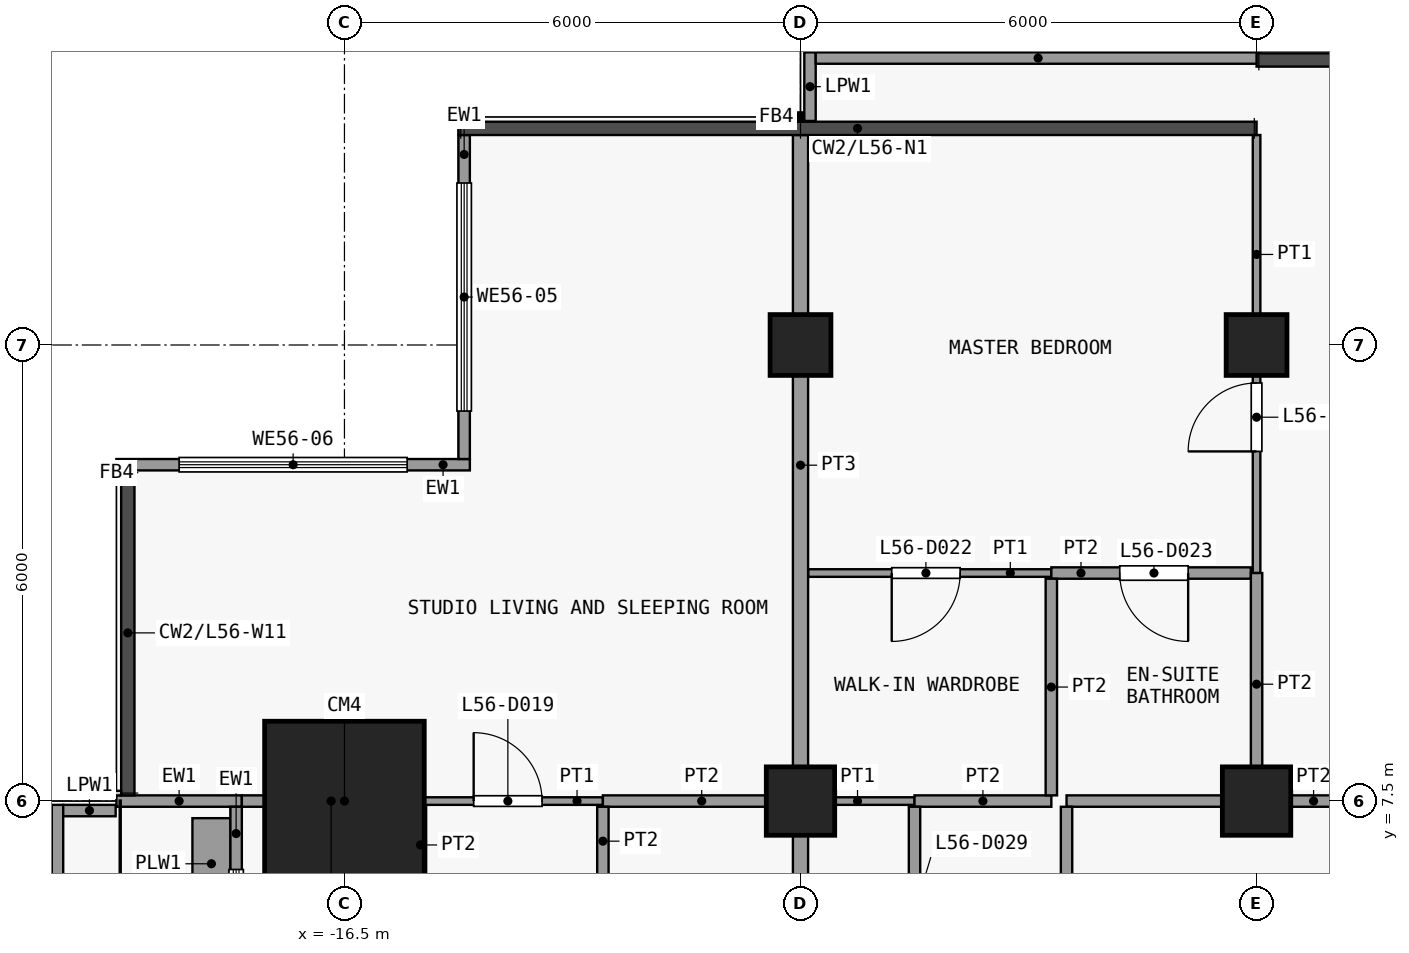
"""IFC4 building model, lengths in metres.
Left out: names, types, materials, properties, quantities, classifications, styles, units other than length and angle.
Written with IfcOpenShell. Run it as: python <this file> out.ifc"""

import sys

from ifc_helpers import new_model, si_unit, direction, frame, frame_2d, origin, origin_2d, place, context, subcontext, project, spatial, rectangle, extrude, element, fill, save


model = new_model("IFC4")
c1 = context("Model", 3, precision=1e-05, world=origin(), true_north=direction((0.0, 1.0)))
c2 = subcontext(c1, "Body", "Model", "MODEL_VIEW")
j1 = project(units=[si_unit("LENGTHUNIT", "METRE"), si_unit("PLANEANGLEUNIT", "RADIAN")], contexts=[c1])
p1 = place(None, origin())
s1 = spatial("IfcSite", under=j1, at=p1, CompositionType="ELEMENT")
p2 = place(p1, origin())
s2 = spatial("IfcBuilding", under=s1, at=p2, CompositionType="ELEMENT")
p3 = place(p2, frame((0.0, 0.0, 223.1)))
s3 = spatial("IfcBuildingStorey", under=s2, at=p3, CompositionType="ELEMENT", Elevation=223.1)
p4 = place(p3, frame((-16.5, 7.5, 0.0), z_axis=(0.0, 0.0, 1.0), x_axis=(1.0, 0.0, 0.0)))
e1 = element("IfcColumn", 1, at=p4, inside=s3, PredefinedType="COLUMN", context=c2, shape_type="SweptSolid", body=[
    extrude(rectangle(XDim=2.1, YDim=2.1, at=origin_2d()), origin(), (0.0, 0.0, 1.0), 3.6),
])
p5 = place(p3, frame((-10.5, 7.5, 0.0), z_axis=(0.0, 0.0, 1.0), x_axis=(1.0, 0.0, 0.0)))
e2 = element("IfcColumn", 2, at=p5, inside=s3, PredefinedType="COLUMN", context=c2, shape_type="SweptSolid", body=[
    extrude(rectangle(XDim=0.9, YDim=0.9, at=origin_2d()), origin(), (0.0, 0.0, 1.0), 3.6),
])
p6 = place(p3, frame((-10.5, 13.5, 0.0), z_axis=(0.0, 0.0, 1.0), x_axis=(1.0, 0.0, 0.0)))
e3 = element("IfcColumn", 3, at=p6, inside=s3, PredefinedType="COLUMN", context=c2, shape_type="SweptSolid", body=[
    extrude(rectangle(XDim=0.8, YDim=0.8, at=origin_2d()), origin(), (0.0, 0.0, 1.0), 3.6),
])
p7 = place(p3, frame((-4.5, 7.5, 0.0), z_axis=(0.0, 0.0, 1.0), x_axis=(1.0, 0.0, 0.0)))
e4 = element("IfcColumn", 4, at=p7, inside=s3, PredefinedType="COLUMN", context=c2, shape_type="SweptSolid", body=[
    extrude(rectangle(XDim=0.9, YDim=0.9, at=origin_2d()), origin(), (0.0, 0.0, 1.0), 3.6),
])
p8 = place(p3, frame((-4.5, 13.5, 0.0), z_axis=(0.0, 0.0, 1.0), x_axis=(1.0, 0.0, 0.0)))
e5 = element("IfcColumn", 5, at=p8, inside=s3, PredefinedType="COLUMN", context=c2, shape_type="SweptSolid", body=[
    extrude(rectangle(XDim=0.8, YDim=0.8, at=origin_2d()), origin(), (0.0, 0.0, 1.0), 3.6),
])
p9 = place(p3, frame((-14.925, 12.0, 0.0), z_axis=(0.0, 0.0, 1.0), x_axis=(0.0, 1.0, 0.0)))
e6 = element("IfcWall", 6, at=p9, inside=s3, PredefinedType="SOLIDWALL", context=c2, shape_type="SweptSolid", body=[
    extrude(rectangle(XDim=4.262, YDim=0.15, at=frame_2d((2.131, 0.0))), origin(), (0.0, 0.0, 1.0), 3.3),
])
p10 = place(p9, frame((0.631, 0.0, 0.9)))
e7 = element("IfcOpeningElement", 7, at=p10, cuts=e6, PredefinedType="OPENING", context=c2, shape_type="SweptSolid", body=[
    extrude(rectangle(XDim=3.0, YDim=2.4, at=frame_2d((1.5, 1.2))), frame((0.0, 0.085, 0.0), z_axis=(0.0, -1.0, 0.0), x_axis=(1.0, 0.0, 0.0)), (0.0, 0.0, 1.0), 0.17),
])
p11 = place(p3, frame((-19.5, 11.925, 0.0), z_axis=(0.0, 0.0, 1.0), x_axis=(1.0, 0.0, 0.0)))
e8 = element("IfcWall", 8, at=p11, inside=s3, PredefinedType="SOLIDWALL", context=c2, shape_type="SweptSolid", body=[
    extrude(rectangle(XDim=4.65, YDim=0.15, at=frame_2d((2.325, 0.0))), origin(), (0.0, 0.0, 1.0), 3.3),
])
p12 = place(p11, frame((0.825, 0.0, 0.9)))
e9 = element("IfcOpeningElement", 9, at=p12, cuts=e8, PredefinedType="OPENING", context=c2, shape_type="SweptSolid", body=[
    extrude(rectangle(XDim=3.0, YDim=2.4, at=frame_2d((1.5, 1.2))), frame((0.0, 0.085, 0.0), z_axis=(0.0, -1.0, 0.0), x_axis=(1.0, 0.0, 0.0)), (0.0, 0.0, 1.0), 0.17),
])
p13 = place(p3, frame((-17.85, 7.5, 0.0), z_axis=(0.0, 0.0, 1.0), x_axis=(-1.0, 0.0, 0.0)))
e10 = element("IfcWall", 10, at=p13, inside=s3, PredefinedType="SOLIDWALL", context=c2, shape_type="SweptSolid", body=[
    extrude(rectangle(XDim=1.65, YDim=0.15, at=frame_2d((0.825, 0.0))), origin(), (0.0, 0.0, 1.0), 3.3),
])
p14 = place(p3, frame((-17.925, 1.575, 0.0), z_axis=(0.0, 0.0, 1.0), x_axis=(0.0, 1.0, 0.0)))
e11 = element("IfcWall", 11, at=p14, inside=s3, PredefinedType="SOLIDWALL", context=c2, shape_type="SweptSolid", body=[
    extrude(rectangle(XDim=5.85, YDim=0.15, at=frame_2d((2.925, 0.0))), origin(), (0.0, 0.0, 1.0), 3.3),
])
p15 = place(p14, frame((1.2, 0.0, 0.0)))
e12 = element("IfcOpeningElement", 12, at=p15, cuts=e11, PredefinedType="OPENING", context=c2, shape_type="SweptSolid", body=[
    extrude(rectangle(XDim=1.2, YDim=2.4, at=frame_2d((0.6, 1.2))), frame((0.0, 0.085, 0.0), z_axis=(0.0, -1.0, 0.0), x_axis=(1.0, 0.0, 0.0)), (0.0, 0.0, 1.0), 0.17),
])
p16 = place(p14, frame((0.25, 0.0, 0.9)))
e13 = element("IfcOpeningElement", 13, at=p16, cuts=e11, PredefinedType="OPENING", context=c2, shape_type="SweptSolid", body=[
    extrude(rectangle(XDim=0.7, YDim=2.1, at=frame_2d((0.35, 1.05))), frame((0.0, 0.085, 0.0), z_axis=(0.0, -1.0, 0.0), x_axis=(1.0, 0.0, 0.0)), (0.0, 0.0, 1.0), 0.17),
])
p17 = place(p14, frame((3.225, 0.0, 0.9)))
e14 = element("IfcOpeningElement", 14, at=p17, cuts=e11, PredefinedType="OPENING", context=c2, shape_type="SweptSolid", body=[
    extrude(rectangle(XDim=1.8, YDim=2.1, at=frame_2d((0.9, 1.05))), frame((0.0, 0.085, 0.0), z_axis=(0.0, -1.0, 0.0), x_axis=(1.0, 0.0, 0.0)), (0.0, 0.0, 1.0), 0.17),
])
p18 = place(p3, frame((-18.25, 6.075, 0.0), z_axis=(0.0, 0.0, 1.0), x_axis=(0.0, 1.0, 0.0)))
e15 = element("IfcWall", 15, at=p18, inside=s3, PredefinedType="USERDEFINED", context=c2, shape_type="SweptSolid", body=[
    extrude(rectangle(XDim=1.2, YDim=0.5, at=frame_2d((0.6, 0.0))), origin(), (0.0, 0.0, 1.0), 0.9),
])
p19 = place(p3, frame((-20.275, 1.51, 0.0), z_axis=(0.0, 0.0, 1.0), x_axis=(0.0, 1.0, 0.0)))
e16 = element("IfcWall", 16, at=p19, inside=s3, PredefinedType="PARAPET", context=c2, shape_type="SweptSolid", body=[
    extrude(rectangle(XDim=5.94, YDim=0.15, at=frame_2d((2.97, 0.0))), origin(), (0.0, 0.0, 1.0), 1.15),
])
p20 = place(p3, frame((-20.2, 7.375, 0.0), z_axis=(0.0, 0.0, 1.0), x_axis=(1.0, 0.0, 0.0)))
e17 = element("IfcWall", 17, at=p20, inside=s3, PredefinedType="PARAPET", context=c2, shape_type="SweptSolid", body=[
    extrude(rectangle(XDim=0.69, YDim=0.15, at=frame_2d((0.345, 0.0))), origin(), (0.0, 0.0, 1.0), 1.15),
])
p21 = place(p3, frame((-10.375, 16.448, 0.0), z_axis=(0.0, 0.0, 1.0), x_axis=(0.0, 1.0, 0.0)))
e18 = element("IfcWall", 18, at=p21, inside=s3, PredefinedType="PARAPET", context=c2, shape_type="SweptSolid", body=[
    extrude(rectangle(XDim=0.903, YDim=0.15, at=frame_2d((0.451, 0.0))), origin(), (0.0, 0.0, 1.0), 1.15),
])
p22 = place(p3, frame((-10.3, 17.275, 0.0), z_axis=(0.0, 0.0, 1.0), x_axis=(1.0, 0.0, 0.0)))
e19 = element("IfcWall", 19, at=p22, inside=s3, PredefinedType="PARAPET", context=c2, shape_type="SweptSolid", body=[
    extrude(rectangle(XDim=5.853, YDim=0.15, at=frame_2d((2.926, 0.0))), origin(), (0.0, 0.0, 1.0), 1.15),
])
p23 = place(p3, frame((-15.5, 7.5, 0.0), z_axis=(0.0, 0.0, 1.0), x_axis=(1.0, 0.0, 0.0)))
e20 = element("IfcWall", 20, at=p23, inside=s3, PredefinedType="PARTITIONING", context=c2, shape_type="SweptSolid", body=[
    extrude(rectangle(XDim=2.4, YDim=0.1, at=frame_2d((1.2, 0.0))), origin(), (0.0, 0.0, 1.0), 3.3),
])
p24 = place(p23, frame((0.7, 0.0, 0.0)))
e21 = element("IfcOpeningElement", 21, at=p24, cuts=e20, PredefinedType="OPENING", context=c2, shape_type="SweptSolid", body=[
    extrude(rectangle(XDim=0.9, YDim=2.1, at=frame_2d((0.45, 1.05))), frame((0.0, 0.06, 0.0), z_axis=(0.0, -1.0, 0.0), x_axis=(1.0, 0.0, 0.0)), (0.0, 0.0, 1.0), 0.12),
])
p25 = place(p3, frame((-10.5, 7.5, 0.0), z_axis=(0.0, 0.0, 1.0), x_axis=(1.0, 0.0, 0.0)))
e22 = element("IfcWall", 22, at=p25, inside=s3, PredefinedType="PARTITIONING", context=c2, shape_type="SweptSolid", body=[
    extrude(rectangle(XDim=1.5, YDim=0.1, at=frame_2d((0.75, 0.0))), origin(), (0.0, 0.0, 1.0), 3.3),
])
p26 = place(p3, frame((-17.85, 7.5, 0.0), z_axis=(0.0, 0.0, 1.0), x_axis=(1.0, 0.0, 0.0)))
e23 = element("IfcWall", 23, at=p26, inside=s3, PredefinedType="PARTITIONING", context=c2, shape_type="SweptSolid", body=[
    extrude(rectangle(XDim=2.35, YDim=0.15, at=frame_2d((1.175, 0.0))), origin(), (0.0, 0.0, 1.0), 3.3),
])
p27 = place(p3, frame((-13.1, 7.5, 0.0), z_axis=(0.0, 0.0, 1.0), x_axis=(1.0, 0.0, 0.0)))
e24 = element("IfcWall", 24, at=p27, inside=s3, PredefinedType="PARTITIONING", context=c2, shape_type="SweptSolid", body=[
    extrude(rectangle(XDim=2.6, YDim=0.15, at=frame_2d((1.3, 0.0))), origin(), (0.0, 0.0, 1.0), 3.3),
])
p28 = place(p3, frame((-9.0, 7.5, 0.0), z_axis=(0.0, 0.0, 1.0), x_axis=(1.0, 0.0, 0.0)))
e25 = element("IfcWall", 25, at=p28, inside=s3, PredefinedType="PARTITIONING", context=c2, shape_type="SweptSolid", body=[
    extrude(rectangle(XDim=1.8, YDim=0.15, at=frame_2d((0.9, 0.0))), origin(), (0.0, 0.0, 1.0), 3.3),
])
p29 = place(p3, frame((-7.0, 7.5, 0.0), z_axis=(0.0, 0.0, 1.0), x_axis=(1.0, 0.0, 0.0)))
e26 = element("IfcWall", 26, at=p29, inside=s3, PredefinedType="PARTITIONING", context=c2, shape_type="SweptSolid", body=[
    extrude(rectangle(XDim=6.5, YDim=0.15, at=frame_2d((3.25, 0.0))), origin(), (0.0, 0.0, 1.0), 3.3),
])
p30 = place(p3, frame((-10.4, 10.5, 0.0), z_axis=(0.0, 0.0, 1.0), x_axis=(1.0, 0.0, 0.0)))
e27 = element("IfcWall", 27, at=p30, inside=s3, PredefinedType="PARTITIONING", context=c2, shape_type="SweptSolid", body=[
    extrude(rectangle(XDim=3.2, YDim=0.1, at=frame_2d((1.6, 0.0))), origin(), (0.0, 0.0, 1.0), 3.3),
])
p31 = place(p30, frame((1.1, 0.0, 0.0)))
e28 = element("IfcOpeningElement", 28, at=p31, cuts=e27, PredefinedType="OPENING", context=c2, shape_type="SweptSolid", body=[
    extrude(rectangle(XDim=0.9, YDim=2.1, at=frame_2d((0.45, 1.05))), frame((0.0, 0.06, 0.0), z_axis=(0.0, -1.0, 0.0), x_axis=(1.0, 0.0, 0.0)), (0.0, 0.0, 1.0), 0.12),
])
p32 = place(p3, frame((-7.2, 10.5, 0.0), z_axis=(0.0, 0.0, 1.0), x_axis=(1.0, 0.0, 0.0)))
e29 = element("IfcWall", 29, at=p32, inside=s3, PredefinedType="PARTITIONING", context=c2, shape_type="SweptSolid", body=[
    extrude(rectangle(XDim=2.625, YDim=0.15, at=frame_2d((1.312, 0.0))), origin(), (0.0, 0.0, 1.0), 3.3),
])
p33 = place(p32, frame((0.9, 0.0, 0.0)))
e30 = element("IfcOpeningElement", 30, at=p33, cuts=e29, PredefinedType="OPENING", context=c2, shape_type="SweptSolid", body=[
    extrude(rectangle(XDim=0.9, YDim=2.1, at=frame_2d((0.45, 1.05))), frame((0.0, 0.085, 0.0), z_axis=(0.0, -1.0, 0.0), x_axis=(1.0, 0.0, 0.0)), (0.0, 0.0, 1.0), 0.17),
])
p34 = place(p3, frame((-15.5, 4.6, 0.0), z_axis=(0.0, 0.0, 1.0), x_axis=(0.0, 1.0, 0.0)))
e31 = element("IfcWall", 31, at=p34, inside=s3, PredefinedType="PARTITIONING", context=c2, shape_type="SweptSolid", body=[
    extrude(rectangle(XDim=2.825, YDim=0.15, at=frame_2d((1.413, 0.0))), origin(), (0.0, 0.0, 1.0), 3.3),
])
p35 = place(p34, frame((0.8, 0.0, 0.0)))
e32 = element("IfcOpeningElement", 32, at=p35, cuts=e31, PredefinedType="OPENING", context=c2, shape_type="SweptSolid", body=[
    extrude(rectangle(XDim=0.9, YDim=2.1, at=frame_2d((0.45, 1.05))), frame((0.0, 0.085, 0.0), z_axis=(0.0, -1.0, 0.0), x_axis=(1.0, 0.0, 0.0)), (0.0, 0.0, 1.0), 0.17),
])
p36 = place(p3, frame((-13.1, 4.6, 0.0), z_axis=(0.0, 0.0, 1.0), x_axis=(0.0, 1.0, 0.0)))
e33 = element("IfcWall", 33, at=p36, inside=s3, PredefinedType="PARTITIONING", context=c2, shape_type="SweptSolid", body=[
    extrude(rectangle(XDim=2.825, YDim=0.15, at=frame_2d((1.413, 0.0))), origin(), (0.0, 0.0, 1.0), 3.3),
])
p37 = place(p36, frame((0.9, 0.0, 0.0)))
e34 = element("IfcOpeningElement", 34, at=p37, cuts=e33, PredefinedType="OPENING", context=c2, shape_type="SweptSolid", body=[
    extrude(rectangle(XDim=0.9, YDim=2.1, at=frame_2d((0.45, 1.05))), frame((0.0, 0.085, 0.0), z_axis=(0.0, -1.0, 0.0), x_axis=(1.0, 0.0, 0.0)), (0.0, 0.0, 1.0), 0.17),
])
p38 = place(p3, frame((-10.5, 4.6, 0.0), z_axis=(0.0, 0.0, 1.0), x_axis=(0.0, 1.0, 0.0)))
e35 = element("IfcWall", 35, at=p38, inside=s3, PredefinedType="PARTITIONING", context=c2, shape_type="SweptSolid", body=[
    extrude(rectangle(XDim=2.825, YDim=0.2, at=frame_2d((1.413, 0.0))), origin(), (0.0, 0.0, 1.0), 3.3),
])
p39 = place(p3, frame((-10.5, 7.575, 0.0), z_axis=(0.0, 0.0, 1.0), x_axis=(0.0, 1.0, 0.0)))
e36 = element("IfcWall", 36, at=p39, inside=s3, PredefinedType="PARTITIONING", context=c2, shape_type="SweptSolid", body=[
    extrude(rectangle(XDim=8.688, YDim=0.2, at=frame_2d((4.344, 0.0))), origin(), (0.0, 0.0, 1.0), 3.3),
])
p40 = place(p3, frame((-9.0, 4.6, 0.0), z_axis=(0.0, 0.0, 1.0), x_axis=(0.0, 1.0, 0.0)))
e37 = element("IfcWall", 37, at=p40, inside=s3, PredefinedType="PARTITIONING", context=c2, shape_type="SweptSolid", body=[
    extrude(rectangle(XDim=2.825, YDim=0.15, at=frame_2d((1.413, 0.0))), origin(), (0.0, 0.0, 1.0), 3.3),
])
p41 = place(p40, frame((1.0, 0.0, 0.0)))
e38 = element("IfcOpeningElement", 38, at=p41, cuts=e37, PredefinedType="OPENING", context=c2, shape_type="SweptSolid", body=[
    extrude(rectangle(XDim=0.9, YDim=2.1, at=frame_2d((0.45, 1.05))), frame((0.0, 0.085, 0.0), z_axis=(0.0, -1.0, 0.0), x_axis=(1.0, 0.0, 0.0)), (0.0, 0.0, 1.0), 0.17),
])
p42 = place(p3, frame((-7.2, 7.575, 0.0), z_axis=(0.0, 0.0, 1.0), x_axis=(0.0, 1.0, 0.0)))
e39 = element("IfcWall", 39, at=p42, inside=s3, PredefinedType="PARTITIONING", context=c2, shape_type="SweptSolid", body=[
    extrude(rectangle(XDim=2.85, YDim=0.15, at=frame_2d((1.425, 0.0))), origin(), (0.0, 0.0, 1.0), 3.3),
])
p43 = place(p3, frame((-7.0, 4.6, 0.0), z_axis=(0.0, 0.0, 1.0), x_axis=(0.0, 1.0, 0.0)))
e40 = element("IfcWall", 40, at=p43, inside=s3, PredefinedType="PARTITIONING", context=c2, shape_type="SweptSolid", body=[
    extrude(rectangle(XDim=2.825, YDim=0.15, at=frame_2d((1.413, 0.0))), origin(), (0.0, 0.0, 1.0), 3.3),
])
p44 = place(p43, frame((1.0, 0.0, 0.0)))
e41 = element("IfcOpeningElement", 41, at=p44, cuts=e40, PredefinedType="OPENING", context=c2, shape_type="SweptSolid", body=[
    extrude(rectangle(XDim=0.9, YDim=2.1, at=frame_2d((0.45, 1.05))), frame((0.0, 0.085, 0.0), z_axis=(0.0, -1.0, 0.0), x_axis=(1.0, 0.0, 0.0)), (0.0, 0.0, 1.0), 0.17),
])
p45 = place(p3, frame((-4.5, 10.5, 0.0), z_axis=(0.0, 0.0, 1.0), x_axis=(0.0, 1.0, 0.0)))
e42 = element("IfcWall", 42, at=p45, inside=s3, PredefinedType="PARTITIONING", context=c2, shape_type="SweptSolid", body=[
    extrude(rectangle(XDim=5.762, YDim=0.1, at=frame_2d((2.881, 0.0))), origin(), (0.0, 0.0, 1.0), 3.3),
])
p46 = place(p45, frame((1.6, 0.0, 0.0)))
e43 = element("IfcOpeningElement", 43, at=p46, cuts=e42, PredefinedType="OPENING", context=c2, shape_type="SweptSolid", body=[
    extrude(rectangle(XDim=0.9, YDim=2.1, at=frame_2d((0.45, 1.05))), frame((0.0, 0.06, 0.0), z_axis=(0.0, -1.0, 0.0), x_axis=(1.0, 0.0, 0.0)), (0.0, 0.0, 1.0), 0.12),
])
p47 = place(p3, frame((-4.5, 7.575, 0.0), z_axis=(0.0, 0.0, 1.0), x_axis=(0.0, 1.0, 0.0)))
e44 = element("IfcWall", 44, at=p47, inside=s3, PredefinedType="PARTITIONING", context=c2, shape_type="SweptSolid", body=[
    extrude(rectangle(XDim=2.925, YDim=0.15, at=frame_2d((1.462, 0.0))), origin(), (0.0, 0.0, 1.0), 3.3),
])
p48 = place(p10, origin())
e45 = element("IfcWindow", 45, at=p48, inside=s3, PartitioningType="SINGLE_PANEL", PredefinedType="WINDOW", context=c2, shape_type="SweptSolid", body=[
    extrude(rectangle(XDim=3.0, YDim=2.4, at=frame_2d((1.5, 1.2))), frame((0.0, 0.03, 0.0), z_axis=(0.0, -1.0, 0.0), x_axis=(1.0, 0.0, 0.0)), (0.0, 0.0, 1.0), 0.06),
])
fill(e7, e45)
p49 = place(p12, origin())
e46 = element("IfcWindow", 46, at=p49, inside=s3, PartitioningType="SINGLE_PANEL", PredefinedType="WINDOW", context=c2, shape_type="SweptSolid", body=[
    extrude(rectangle(XDim=3.0, YDim=2.4, at=frame_2d((1.5, 1.2))), frame((0.0, 0.03, 0.0), z_axis=(0.0, -1.0, 0.0), x_axis=(1.0, 0.0, 0.0)), (0.0, 0.0, 1.0), 0.06),
])
fill(e9, e46)
p50 = place(p17, origin())
e47 = element("IfcWindow", 47, at=p50, inside=s3, PartitioningType="SINGLE_PANEL", PredefinedType="WINDOW", context=c2, shape_type="SweptSolid", body=[
    extrude(rectangle(XDim=1.8, YDim=2.1, at=frame_2d((0.9, 1.05))), frame((0.0, 0.03, 0.0), z_axis=(0.0, -1.0, 0.0), x_axis=(1.0, 0.0, 0.0)), (0.0, 0.0, 1.0), 0.06),
])
fill(e14, e47)
p51 = place(p24, origin())
e48 = element("IfcDoor", 48, at=p51, inside=s3, OperationType="SINGLE_SWING_RIGHT", PredefinedType="DOOR", context=c2, shape_type="SweptSolid", body=[
    extrude(rectangle(XDim=0.9, YDim=2.1, at=frame_2d((0.45, 1.05))), frame((0.0, 0.025, 0.0), z_axis=(0.0, -1.0, 0.0), x_axis=(1.0, 0.0, 0.0)), (0.0, 0.0, 1.0), 0.05),
])
fill(e21, e48)
p52 = place(p31, origin())
e49 = element("IfcDoor", 49, at=p52, inside=s3, OperationType="SINGLE_SWING_LEFT", PredefinedType="DOOR", context=c2, shape_type="SweptSolid", body=[
    extrude(rectangle(XDim=0.9, YDim=2.1, at=frame_2d((0.45, 1.05))), frame((0.0, 0.025, 0.0), z_axis=(0.0, -1.0, 0.0), x_axis=(1.0, 0.0, 0.0)), (0.0, 0.0, 1.0), 0.05),
])
fill(e28, e49)
p53 = place(p33, origin())
e50 = element("IfcDoor", 50, at=p53, inside=s3, OperationType="SINGLE_SWING_RIGHT", PredefinedType="DOOR", context=c2, shape_type="SweptSolid", body=[
    extrude(rectangle(XDim=0.9, YDim=2.1, at=frame_2d((0.45, 1.05))), frame((0.0, 0.025, 0.0), z_axis=(0.0, -1.0, 0.0), x_axis=(1.0, 0.0, 0.0)), (0.0, 0.0, 1.0), 0.05),
])
fill(e30, e50)
p54 = place(p46, origin())
e51 = element("IfcDoor", 51, at=p54, inside=s3, OperationType="SINGLE_SWING_RIGHT", PredefinedType="DOOR", context=c2, shape_type="SweptSolid", body=[
    extrude(rectangle(XDim=0.9, YDim=2.1, at=frame_2d((0.45, 1.05))), frame((0.0, 0.025, 0.0), z_axis=(0.0, -1.0, 0.0), x_axis=(1.0, 0.0, 0.0)), (0.0, 0.0, 1.0), 0.05),
])
fill(e43, e51)
save(model, sys.argv[1])
